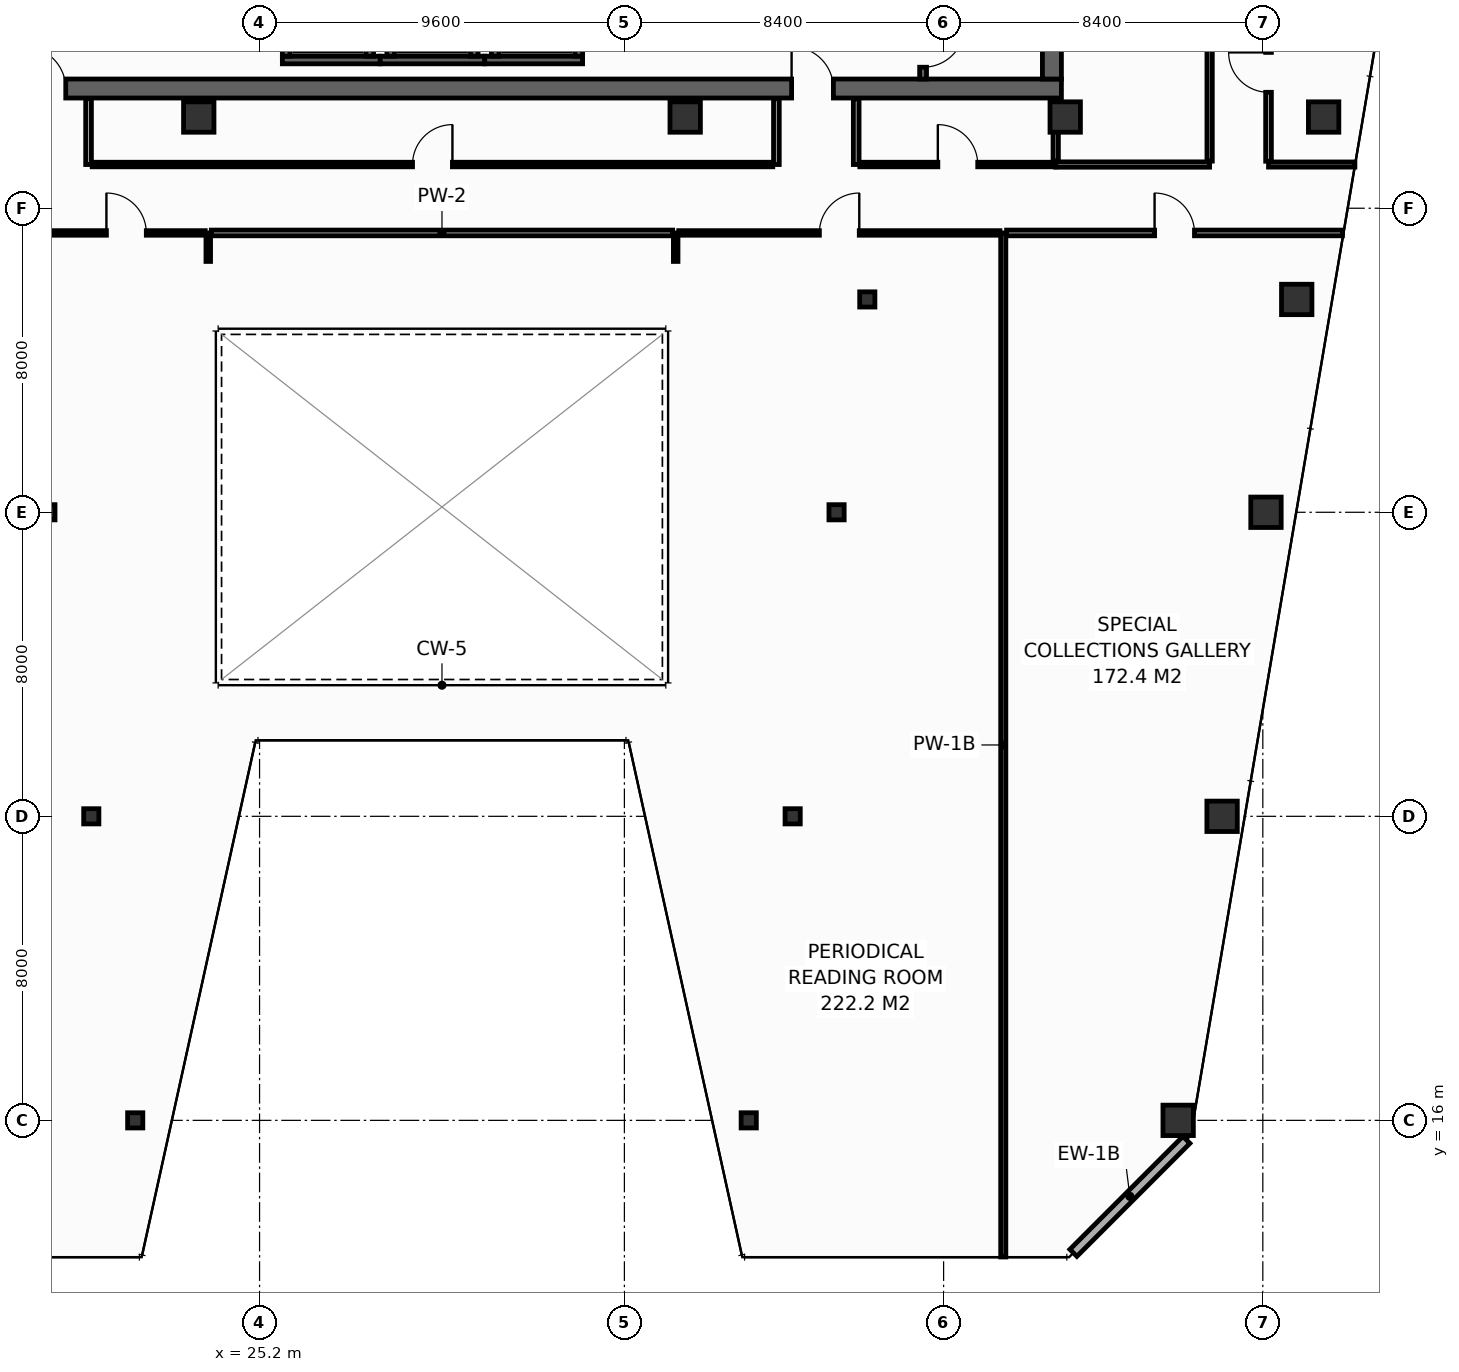
"""IFC4 building model, lengths in metres.
Left out: names, types, materials, properties, quantities, classifications, styles, units other than length and angle.
Written with IfcOpenShell. Run it as: python <this file> out.ifc"""

import sys

from ifc_helpers import new_model, si_unit, direction, frame, frame_2d, origin, origin_2d, place, context, subcontext, project, spatial, rectangle, hollow_rectangle, extrude, element, fill, save


model = new_model("IFC4")
c1 = context("Model", 3, precision=1e-05, world=origin(), true_north=direction((0.0, 1.0)))
c2 = subcontext(c1, "Body", "Model", "MODEL_VIEW")
j1 = project(units=[si_unit("LENGTHUNIT", "METRE"), si_unit("PLANEANGLEUNIT", "RADIAN")], contexts=[c1])
p1 = place(None, origin())
s1 = spatial("IfcSite", under=j1, at=p1, CompositionType="ELEMENT")
p2 = place(p1, origin())
s2 = spatial("IfcBuilding", under=s1, at=p2, CompositionType="ELEMENT")
p3 = place(p2, frame((0.0, 0.0, 190.4)))
s3 = spatial("IfcBuildingStorey", under=s2, at=p3, CompositionType="ELEMENT", Elevation=190.4)
p4 = place(p3, frame((13.6, 43.15, 0.0), z_axis=(0.0, 0.0, 1.0), x_axis=(1.0, 0.0, 0.0)))
e1 = element("IfcWall", 1, at=p4, inside=s3, PredefinedType="SHEAR", context=c2, shape_type="SweptSolid", body=[
    extrude(rectangle(XDim=32.7, YDim=0.5, at=frame_2d((16.35, 0.0))), origin(), (0.0, 0.0, 1.0), 3.55),
])
p5 = place(p4, frame((5.4, 0.0, 0.0)))
e2 = element("IfcOpeningElement", 2, at=p5, cuts=e1, PredefinedType="OPENING", context=c2, shape_type="SweptSolid", body=[
    extrude(rectangle(XDim=1.1, YDim=2.15, at=frame_2d((0.55, 1.075))), frame((0.0, 0.26, 0.0), z_axis=(0.0, -1.0, 0.0), x_axis=(1.0, 0.0, 0.0)), (0.0, 0.0, 1.0), 0.52),
])
p6 = place(p4, frame((25.6, 0.0, 0.0)))
e3 = element("IfcOpeningElement", 3, at=p6, cuts=e1, PredefinedType="OPENING", context=c2, shape_type="SweptSolid", body=[
    extrude(rectangle(XDim=1.1, YDim=2.15, at=frame_2d((0.55, 1.075))), frame((0.0, 0.26, 0.0), z_axis=(0.0, -1.0, 0.0), x_axis=(1.0, 0.0, 0.0)), (0.0, 0.0, 1.0), 0.52),
])
p7 = place(p3, frame((46.05, 43.4, 0.0), z_axis=(0.0, 0.0, 1.0), x_axis=(0.0, 1.0, 0.0)))
e4 = element("IfcWall", 4, at=p7, inside=s3, PredefinedType="SHEAR", context=c2, shape_type="SweptSolid", body=[
    extrude(rectangle(XDim=10.4, YDim=0.5, at=frame_2d((5.2, 0.0))), origin(), (0.0, 0.0, 1.0), 3.55),
])
for number, where, z_axis, x_axis in (
    (5, (23.6, 42.4, 0.0), (0.0, 0.0, 1.0), (1.0, 0.0, 0.0)),
    (6, (36.4, 42.4, 0.0), (0.0, 0.0, 1.0), (1.0, 0.0, 0.0)),
    (7, (46.4, 42.4, 0.0), (0.0, 0.0, 1.0), (1.0, 0.0, 0.0)),
    (8, (53.2, 42.4, 0.0), (0.0, 0.0, 1.0), (1.0, 0.0, 0.0)),
    (9, (49.372, 16.0, 0.0), (0.0, 0.0, 1.0), (1.0, 0.0, 0.0)),
):
    element("IfcColumn", number, at=place(p3, frame(where, z_axis=z_axis, x_axis=x_axis)), inside=s3, PredefinedType="COLUMN", context=c2, shape_type="SweptSolid", body=[
        extrude(hollow_rectangle(XDim=0.8, YDim=0.8, WallThickness=0.036, at=origin_2d()), origin(), (0.0, 0.0, 1.0), 3.8),
    ])
for number, where, z_axis, x_axis in (
    (10, (21.928, 16.0, 0.0), (0.0, 0.0, 1.0), (1.0, 0.0, 0.0)),
    (11, (38.072, 16.0, 0.0), (0.0, 0.0, 1.0), (1.0, 0.0, 0.0)),
):
    element("IfcColumn", number, at=place(p3, frame(where, z_axis=z_axis, x_axis=x_axis)), inside=s3, PredefinedType="COLUMN", context=c2, shape_type="SweptSolid", body=[
        extrude(hollow_rectangle(XDim=0.4, YDim=0.4, WallThickness=0.016, at=origin_2d()), origin(), (0.0, 0.0, 1.0), 3.8),
    ])
p8 = place(p3, frame((50.528, 24.0, 0.0), z_axis=(0.0, 0.0, 1.0), x_axis=(1.0, 0.0, 0.0)))
e12 = element("IfcColumn", 12, at=p8, inside=s3, PredefinedType="COLUMN", context=c2, shape_type="SweptSolid", body=[
    extrude(hollow_rectangle(XDim=0.8, YDim=0.8, WallThickness=0.036, at=origin_2d()), origin(), (0.0, 0.0, 1.0), 3.8),
])
for number, where, z_axis, x_axis in (
    (13, (20.772, 24.0, 0.0), (0.0, 0.0, 1.0), (1.0, 0.0, 0.0)),
    (14, (39.228, 24.0, 0.0), (0.0, 0.0, 1.0), (1.0, 0.0, 0.0)),
):
    element("IfcColumn", number, at=place(p3, frame(where, z_axis=z_axis, x_axis=x_axis)), inside=s3, PredefinedType="COLUMN", context=c2, shape_type="SweptSolid", body=[
        extrude(hollow_rectangle(XDim=0.4, YDim=0.4, WallThickness=0.016, at=origin_2d()), origin(), (0.0, 0.0, 1.0), 3.8),
    ])
p9 = place(p3, frame((51.683, 32.0, 0.0), z_axis=(0.0, 0.0, 1.0), x_axis=(1.0, 0.0, 0.0)))
e15 = element("IfcColumn", 15, at=p9, inside=s3, PredefinedType="COLUMN", context=c2, shape_type="SweptSolid", body=[
    extrude(hollow_rectangle(XDim=0.8, YDim=0.8, WallThickness=0.036, at=origin_2d()), origin(), (0.0, 0.0, 1.0), 3.8),
])
for number, where, z_axis, x_axis in (
    (16, (19.617, 32.0, 0.0), (0.0, 0.0, 1.0), (1.0, 0.0, 0.0)),
    (17, (40.383, 32.0, 0.0), (0.0, 0.0, 1.0), (1.0, 0.0, 0.0)),
):
    element("IfcColumn", number, at=place(p3, frame(where, z_axis=z_axis, x_axis=x_axis)), inside=s3, PredefinedType="COLUMN", context=c2, shape_type="SweptSolid", body=[
        extrude(hollow_rectangle(XDim=0.4, YDim=0.4, WallThickness=0.016, at=origin_2d()), origin(), (0.0, 0.0, 1.0), 3.8),
    ])
p10 = place(p3, frame((52.492, 37.6, 0.0), z_axis=(0.0, 0.0, 1.0), x_axis=(1.0, 0.0, 0.0)))
e18 = element("IfcColumn", 18, at=p10, inside=s3, PredefinedType="COLUMN", context=c2, shape_type="SweptSolid", body=[
    extrude(hollow_rectangle(XDim=0.8, YDim=0.8, WallThickness=0.036, at=origin_2d()), origin(), (0.0, 0.0, 1.0), 3.8),
])
p11 = place(p3, frame((41.192, 37.6, 0.0), z_axis=(0.0, 0.0, 1.0), x_axis=(1.0, 0.0, 0.0)))
e19 = element("IfcColumn", 19, at=p11, inside=s3, PredefinedType="COLUMN", context=c2, shape_type="SweptSolid", body=[
    extrude(hollow_rectangle(XDim=0.4, YDim=0.4, WallThickness=0.016, at=origin_2d()), origin(), (0.0, 0.0, 1.0), 3.8),
])
p12 = place(p3, frame((25.8, 43.9, 0.0), z_axis=(0.0, 0.0, 1.0), x_axis=(1.0, 0.0, 0.0)))
e20 = element("IfcWall", 20, at=p12, inside=s3, PredefinedType="SHEAR", context=c2, shape_type="SweptSolid", body=[
    extrude(rectangle(XDim=2.575, YDim=0.2, at=frame_2d((1.288, 0.0))), origin(), (0.0, 0.0, 1.0), 3.55),
])
for number, where, z_axis, x_axis in (
    (21, (25.9, 44.0, 0.0), (0.0, 0.0, 1.0), (0.0, 1.0, 0.0)),
    (22, (28.1, 44.0, 0.0), (0.0, 0.0, 1.0), (0.0, 1.0, 0.0)),
):
    element("IfcWall", number, at=place(p3, frame(where, z_axis=z_axis, x_axis=x_axis)), inside=s3, PredefinedType="SHEAR", context=c2, shape_type="SweptSolid", body=[
        extrude(rectangle(XDim=2.3, YDim=0.2, at=frame_2d((1.15, 0.0))), origin(), (0.0, 0.0, 1.0), 3.55),
    ])
p13 = place(p3, frame((28.375, 43.9, 0.0), z_axis=(0.0, 0.0, 1.0), x_axis=(1.0, 0.0, 0.0)))
e23 = element("IfcWall", 23, at=p13, inside=s3, PredefinedType="SHEAR", context=c2, shape_type="SweptSolid", body=[
    extrude(rectangle(XDim=2.75, YDim=0.2, at=frame_2d((1.375, 0.0))), origin(), (0.0, 0.0, 1.0), 3.55),
])
for number, where, z_axis, x_axis in (
    (24, (28.65, 44.0, 0.0), (0.0, 0.0, 1.0), (0.0, 1.0, 0.0)),
    (25, (30.85, 44.0, 0.0), (0.0, 0.0, 1.0), (0.0, 1.0, 0.0)),
):
    element("IfcWall", number, at=place(p3, frame(where, z_axis=z_axis, x_axis=x_axis)), inside=s3, PredefinedType="SHEAR", context=c2, shape_type="SweptSolid", body=[
        extrude(rectangle(XDim=2.3, YDim=0.2, at=frame_2d((1.15, 0.0))), origin(), (0.0, 0.0, 1.0), 3.55),
    ])
p14 = place(p3, frame((31.125, 43.9, 0.0), z_axis=(0.0, 0.0, 1.0), x_axis=(1.0, 0.0, 0.0)))
e26 = element("IfcWall", 26, at=p14, inside=s3, PredefinedType="SHEAR", context=c2, shape_type="SweptSolid", body=[
    extrude(rectangle(XDim=2.575, YDim=0.2, at=frame_2d((1.288, 0.0))), origin(), (0.0, 0.0, 1.0), 3.55),
])
for number, where, z_axis, x_axis in (
    (27, (31.4, 44.0, 0.0), (0.0, 0.0, 1.0), (0.0, 1.0, 0.0)),
    (28, (33.6, 44.0, 0.0), (0.0, 0.0, 1.0), (0.0, 1.0, 0.0)),
):
    element("IfcWall", number, at=place(p3, frame(where, z_axis=z_axis, x_axis=x_axis)), inside=s3, PredefinedType="SHEAR", context=c2, shape_type="SweptSolid", body=[
        extrude(rectangle(XDim=2.3, YDim=0.2, at=frame_2d((1.15, 0.0))), origin(), (0.0, 0.0, 1.0), 3.55),
    ])
p15 = place(p3, frame((42.66, 53.8, 0.0), z_axis=(0.0, 0.0, 1.0), x_axis=(0.0, -1.0, 0.0)))
e29 = element("IfcWall", 29, at=p15, inside=s3, PredefinedType="SHEAR", context=c2, shape_type="SweptSolid", body=[
    extrude(rectangle(XDim=10.4, YDim=0.18, at=frame_2d((5.2, 0.0))), origin(), (0.0, 0.0, 1.0), 3.55),
])
p16 = place(p15, frame((8.99, 0.0, 0.0)))
e30 = element("IfcOpeningElement", 30, at=p16, cuts=e29, PredefinedType="OPENING", context=c2, shape_type="SweptSolid", body=[
    extrude(rectangle(XDim=1.1, YDim=2.15, at=frame_2d((0.55, 1.075))), frame((0.0, 0.1, 0.0), z_axis=(0.0, -1.0, 0.0), x_axis=(1.0, 0.0, 0.0)), (0.0, 0.0, 1.0), 0.2),
])
p17 = place(p3, frame((46.615, 12.513, 0.0), z_axis=(0.0, 0.0, 1.0), x_axis=(0.707135806771, 0.70707775441, 0.0)))
e31 = element("IfcWall", 31, at=p17, inside=s3, PredefinedType="STANDARD", context=c2, shape_type="SweptSolid", body=[
    extrude(rectangle(XDim=4.206, YDim=0.26, at=frame_2d((2.103, 0.0))), origin(), (0.0, 0.0, 1.0), 3.55),
])
p18 = place(p3, frame((46.15, 41.15, 0.0), z_axis=(0.0, 0.0, 1.0), x_axis=(1.0, 0.0, 0.0)))
e32 = element("IfcWall", 32, at=p18, inside=s3, PredefinedType="PARTITIONING", context=c2, shape_type="SweptSolid", body=[
    extrude(rectangle(XDim=4.05, YDim=0.14, at=frame_2d((2.025, 0.0))), origin(), (0.0, 0.0, 1.0), 3.55),
])
p19 = place(p3, frame((46.15, 41.24, 0.0), z_axis=(0.0, 0.0, 1.0), x_axis=(0.0, 1.0, 0.0)))
e33 = element("IfcWall", 33, at=p19, inside=s3, PredefinedType="PARTITIONING", context=c2, shape_type="SweptSolid", body=[
    extrude(rectangle(XDim=1.64, YDim=0.14, at=frame_2d((0.82, 0.0))), origin(), (0.0, 0.0, 1.0), 3.55),
])
p20 = place(p3, frame((50.2, 41.24, 0.0), z_axis=(0.0, 0.0, 1.0), x_axis=(0.0, 1.0, 0.0)))
e34 = element("IfcWall", 34, at=p20, inside=s3, PredefinedType="PARTITIONING", context=c2, shape_type="SweptSolid", body=[
    extrude(rectangle(XDim=6.87, YDim=0.14, at=frame_2d((3.435, 0.0))), origin(), (0.0, 0.0, 1.0), 2.835),
])
p21 = place(p20, frame((2.985, 0.0, 0.0)))
e35 = element("IfcOpeningElement", 35, at=p21, cuts=e34, PredefinedType="OPENING", context=c2, shape_type="SweptSolid", body=[
    extrude(rectangle(XDim=0.9, YDim=2.1, at=frame_2d((0.45, 1.05))), frame((0.0, 0.08, 0.0), z_axis=(0.0, -1.0, 0.0), x_axis=(1.0, 0.0, 0.0)), (0.0, 0.0, 1.0), 0.16),
])
p22 = place(p3, frame((51.75, 41.15, 0.0), z_axis=(0.0, 0.0, 1.0), x_axis=(1.0, 0.0, 0.0)))
e36 = element("IfcWall", 36, at=p22, inside=s3, PredefinedType="PARTITIONING", context=c2, shape_type="SweptSolid", body=[
    extrude(rectangle(XDim=2.273, YDim=0.135, at=frame_2d((1.136, 0.0))), origin(), (0.0, 0.0, 1.0), 3.035),
])
p23 = place(p3, frame((51.75, 41.238, 0.0), z_axis=(0.0, 0.0, 1.0), x_axis=(0.0, 1.0, 0.0)))
e37 = element("IfcWall", 37, at=p23, inside=s3, PredefinedType="PARTITIONING", context=c2, shape_type="SweptSolid", body=[
    extrude(rectangle(XDim=4.675, YDim=0.15, at=frame_2d((2.337, 0.0))), origin(), (0.0, 0.0, 1.0), 2.835),
])
p24 = place(p23, frame((1.813, 0.0, 0.0)))
e38 = element("IfcOpeningElement", 38, at=p24, cuts=e37, PredefinedType="OPENING", context=c2, shape_type="SweptSolid", body=[
    extrude(rectangle(XDim=1.05, YDim=2.15, at=frame_2d((0.525, 1.075))), frame((0.0, 0.085, 0.0), z_axis=(0.0, -1.0, 0.0), x_axis=(1.0, 0.0, 0.0)), (0.0, 0.0, 1.0), 0.17),
])
for number, where, z_axis, x_axis in (
    (39, (20.7, 41.15, 0.0), (0.0, 0.0, 1.0), (0.0, 1.0, 0.0)),
    (40, (38.8, 41.15, 0.0), (0.0, 0.0, 1.0), (0.0, 1.0, 0.0)),
    (41, (40.9, 41.15, 0.0), (0.0, 0.0, 1.0), (0.0, 1.0, 0.0)),
):
    element("IfcWall", number, at=place(p3, frame(where, z_axis=z_axis, x_axis=x_axis)), inside=s3, PredefinedType="PARTITIONING", context=c2, shape_type="SweptSolid", body=[
        extrude(rectangle(XDim=1.73, YDim=0.15, at=frame_2d((0.865, 0.0))), origin(), (0.0, 0.0, 1.0), 3.55),
    ])
p25 = place(p3, frame((20.795, 41.15, 0.0), z_axis=(0.0, 0.0, 1.0), x_axis=(1.0, 0.0, 0.0)))
e42 = element("IfcWall", 42, at=p25, inside=s3, PredefinedType="PARTITIONING", context=c2, shape_type="SweptSolid", body=[
    extrude(rectangle(XDim=17.91, YDim=0.12, at=frame_2d((8.955, 0.0))), origin(), (0.0, 0.0, 1.0), 2.835),
])
p26 = place(p25, frame((8.43, 0.0, 0.0)))
e43 = element("IfcOpeningElement", 43, at=p26, cuts=e42, PredefinedType="OPENING", context=c2, shape_type="SweptSolid", body=[
    extrude(rectangle(XDim=1.05, YDim=2.15, at=frame_2d((0.525, 1.075))), frame((0.0, 0.07, 0.0), z_axis=(0.0, -1.0, 0.0), x_axis=(1.0, 0.0, 0.0)), (0.0, 0.0, 1.0), 0.14),
])
p27 = place(p3, frame((40.995, 41.15, 0.0), z_axis=(0.0, 0.0, 1.0), x_axis=(1.0, 0.0, 0.0)))
e44 = element("IfcWall", 44, at=p27, inside=s3, PredefinedType="PARTITIONING", context=c2, shape_type="SweptSolid", body=[
    extrude(rectangle(XDim=5.155, YDim=0.12, at=frame_2d((2.577, 0.0))), origin(), (0.0, 0.0, 1.0), 3.55),
])
p28 = place(p27, frame((2.053, 0.0, 0.0)))
e45 = element("IfcOpeningElement", 45, at=p28, cuts=e44, PredefinedType="OPENING", context=c2, shape_type="SweptSolid", body=[
    extrude(rectangle(XDim=1.05, YDim=2.15, at=frame_2d((0.525, 1.075))), frame((0.0, 0.07, 0.0), z_axis=(0.0, -1.0, 0.0), x_axis=(1.0, 0.0, 0.0)), (0.0, 0.0, 1.0), 0.14),
])
p29 = place(p3, frame((44.77, 12.405, 0.0), z_axis=(0.0, 0.0, 1.0), x_axis=(0.0, 1.0, 0.0)))
e46 = element("IfcWall", 46, at=p29, inside=s3, PredefinedType="PARTITIONING", context=c2, shape_type="SweptSolid", body=[
    extrude(rectangle(XDim=26.945, YDim=0.135, at=frame_2d((13.473, 0.0))), origin(), (0.0, 0.0, 1.0), 2.835),
])
for number, where, z_axis, x_axis in (
    (47, (23.85, 38.6, 0.0), (0.0, 0.0, 1.0), (0.0, 1.0, 0.0)),
    (48, (36.15, 38.6, 0.0), (0.0, 0.0, 1.0), (0.0, 1.0, 0.0)),
):
    element("IfcWall", number, at=place(p3, frame(where, z_axis=z_axis, x_axis=x_axis)), inside=s3, PredefinedType="PARTITIONING", context=c2, shape_type="SweptSolid", body=[
        extrude(rectangle(XDim=0.75, YDim=0.12, at=frame_2d((0.375, 0.0))), origin(), (0.0, 0.0, 1.0), 3.55),
    ])
p30 = place(p3, frame((19.62, 39.35, 0.0), z_axis=(0.0, 0.0, 1.0), x_axis=(1.0, 0.0, 0.0)))
e49 = element("IfcWall", 49, at=p30, inside=s3, PredefinedType="PARTITIONING", context=c2, shape_type="SweptSolid", body=[
    extrude(rectangle(XDim=4.15, YDim=0.12, at=frame_2d((2.075, 0.0))), origin(), (0.0, 0.0, 1.0), 2.835),
])
p31 = place(p30, frame((1.55, 0.0, 0.0)))
e50 = element("IfcOpeningElement", 50, at=p31, cuts=e49, PredefinedType="OPENING", context=c2, shape_type="SweptSolid", body=[
    extrude(rectangle(XDim=1.05, YDim=2.15, at=frame_2d((0.525, 1.075))), frame((0.0, 0.07, 0.0), z_axis=(0.0, -1.0, 0.0), x_axis=(1.0, 0.0, 0.0)), (0.0, 0.0, 1.0), 0.14),
])
p32 = place(p3, frame((23.93, 39.35, 0.0), z_axis=(0.0, 0.0, 1.0), x_axis=(1.0, 0.0, 0.0)))
e51 = element("IfcWall", 51, at=p32, inside=s3, PredefinedType="PARTITIONING", context=c2, shape_type="SweptSolid", body=[
    extrude(rectangle(XDim=12.14, YDim=0.15, at=frame_2d((6.07, 0.0))), origin(), (0.0, 0.0, 1.0), 3.55),
])
p33 = place(p3, frame((36.23, 39.35, 0.0), z_axis=(0.0, 0.0, 1.0), x_axis=(1.0, 0.0, 0.0)))
e52 = element("IfcWall", 52, at=p33, inside=s3, PredefinedType="PARTITIONING", context=c2, shape_type="SweptSolid", body=[
    extrude(rectangle(XDim=8.453, YDim=0.12, at=frame_2d((4.226, 0.0))), origin(), (0.0, 0.0, 1.0), 2.835),
])
p34 = place(p33, frame((3.701, 0.0, 0.0)))
e53 = element("IfcOpeningElement", 53, at=p34, cuts=e52, PredefinedType="OPENING", context=c2, shape_type="SweptSolid", body=[
    extrude(rectangle(XDim=1.05, YDim=2.15, at=frame_2d((0.525, 1.075))), frame((0.0, 0.07, 0.0), z_axis=(0.0, -1.0, 0.0), x_axis=(1.0, 0.0, 0.0)), (0.0, 0.0, 1.0), 0.14),
])
p35 = place(p3, frame((44.857, 39.35, 0.0), z_axis=(0.0, 0.0, 1.0), x_axis=(1.0, 0.0, 0.0)))
e54 = element("IfcWall", 54, at=p35, inside=s3, PredefinedType="PARTITIONING", context=c2, shape_type="SweptSolid", body=[
    extrude(rectangle(XDim=8.838, YDim=0.15, at=frame_2d((4.419, 0.0))), origin(), (0.0, 0.0, 1.0), 3.035),
])
p36 = place(p35, frame((3.894, 0.0, 0.0)))
e55 = element("IfcOpeningElement", 55, at=p36, cuts=e54, PredefinedType="OPENING", context=c2, shape_type="SweptSolid", body=[
    extrude(rectangle(XDim=1.05, YDim=2.15, at=frame_2d((0.525, 1.075))), frame((0.0, 0.085, 0.0), z_axis=(0.0, -1.0, 0.0), x_axis=(1.0, 0.0, 0.0)), (0.0, 0.0, 1.0), 0.17),
])
p37 = place(p16, origin())
e56 = element("IfcDoor", 56, at=p37, inside=s3, OperationType="SINGLE_SWING_LEFT", PredefinedType="DOOR", context=c2, shape_type="SweptSolid", body=[
    extrude(rectangle(XDim=1.1, YDim=2.15, at=frame_2d((0.55, 1.075))), frame((0.0, 0.025, 0.0), z_axis=(0.0, -1.0, 0.0), x_axis=(1.0, 0.0, 0.0)), (0.0, 0.0, 1.0), 0.05),
])
fill(e30, e56)
p38 = place(p5, origin())
e57 = element("IfcDoor", 57, at=p38, inside=s3, OperationType="SINGLE_SWING_LEFT", PredefinedType="DOOR", context=c2, shape_type="SweptSolid", body=[
    extrude(rectangle(XDim=1.1, YDim=2.15, at=frame_2d((0.55, 1.075))), frame((0.0, 0.025, 0.0), z_axis=(0.0, -1.0, 0.0), x_axis=(1.0, 0.0, 0.0)), (0.0, 0.0, 1.0), 0.05),
])
fill(e2, e57)
p39 = place(p6, origin())
e58 = element("IfcDoor", 58, at=p39, inside=s3, OperationType="SINGLE_SWING_LEFT", PredefinedType="DOOR", context=c2, shape_type="SweptSolid", body=[
    extrude(rectangle(XDim=1.1, YDim=2.15, at=frame_2d((0.55, 1.075))), frame((0.0, 0.025, 0.0), z_axis=(0.0, -1.0, 0.0), x_axis=(1.0, 0.0, 0.0)), (0.0, 0.0, 1.0), 0.05),
])
fill(e3, e58)
p40 = place(p24, origin())
e59 = element("IfcDoor", 59, at=p40, inside=s3, OperationType="SINGLE_SWING_RIGHT", PredefinedType="DOOR", context=c2, shape_type="SweptSolid", body=[
    extrude(rectangle(XDim=1.05, YDim=2.15, at=frame_2d((0.525, 1.075))), frame((0.0, 0.025, 0.0), z_axis=(0.0, -1.0, 0.0), x_axis=(1.0, 0.0, 0.0)), (0.0, 0.0, 1.0), 0.05),
])
fill(e38, e59)
p41 = place(p26, origin())
e60 = element("IfcDoor", 60, at=p41, inside=s3, OperationType="SINGLE_SWING_RIGHT", PredefinedType="DOOR", context=c2, shape_type="SweptSolid", body=[
    extrude(rectangle(XDim=1.05, YDim=2.15, at=frame_2d((0.525, 1.075))), frame((0.0, 0.025, 0.0), z_axis=(0.0, -1.0, 0.0), x_axis=(1.0, 0.0, 0.0)), (0.0, 0.0, 1.0), 0.05),
])
fill(e43, e60)
p42 = place(p28, origin())
e61 = element("IfcDoor", 61, at=p42, inside=s3, OperationType="SINGLE_SWING_LEFT", PredefinedType="DOOR", context=c2, shape_type="SweptSolid", body=[
    extrude(rectangle(XDim=1.05, YDim=2.15, at=frame_2d((0.525, 1.075))), frame((0.0, 0.025, 0.0), z_axis=(0.0, -1.0, 0.0), x_axis=(1.0, 0.0, 0.0)), (0.0, 0.0, 1.0), 0.05),
])
fill(e45, e61)
p43 = place(p31, origin())
e62 = element("IfcDoor", 62, at=p43, inside=s3, OperationType="SINGLE_SWING_LEFT", PredefinedType="DOOR", context=c2, shape_type="SweptSolid", body=[
    extrude(rectangle(XDim=1.05, YDim=2.15, at=frame_2d((0.525, 1.075))), frame((0.0, 0.025, 0.0), z_axis=(0.0, -1.0, 0.0), x_axis=(1.0, 0.0, 0.0)), (0.0, 0.0, 1.0), 0.05),
])
fill(e50, e62)
p44 = place(p34, origin())
e63 = element("IfcDoor", 63, at=p44, inside=s3, OperationType="SINGLE_SWING_RIGHT", PredefinedType="DOOR", context=c2, shape_type="SweptSolid", body=[
    extrude(rectangle(XDim=1.05, YDim=2.15, at=frame_2d((0.525, 1.075))), frame((0.0, 0.025, 0.0), z_axis=(0.0, -1.0, 0.0), x_axis=(1.0, 0.0, 0.0)), (0.0, 0.0, 1.0), 0.05),
])
fill(e53, e63)
p45 = place(p36, origin())
e64 = element("IfcDoor", 64, at=p45, inside=s3, OperationType="SINGLE_SWING_LEFT", PredefinedType="DOOR", context=c2, shape_type="SweptSolid", body=[
    extrude(rectangle(XDim=1.05, YDim=2.15, at=frame_2d((0.525, 1.075))), frame((0.0, 0.025, 0.0), z_axis=(0.0, -1.0, 0.0), x_axis=(1.0, 0.0, 0.0)), (0.0, 0.0, 1.0), 0.05),
])
fill(e55, e64)
save(model, sys.argv[1])
